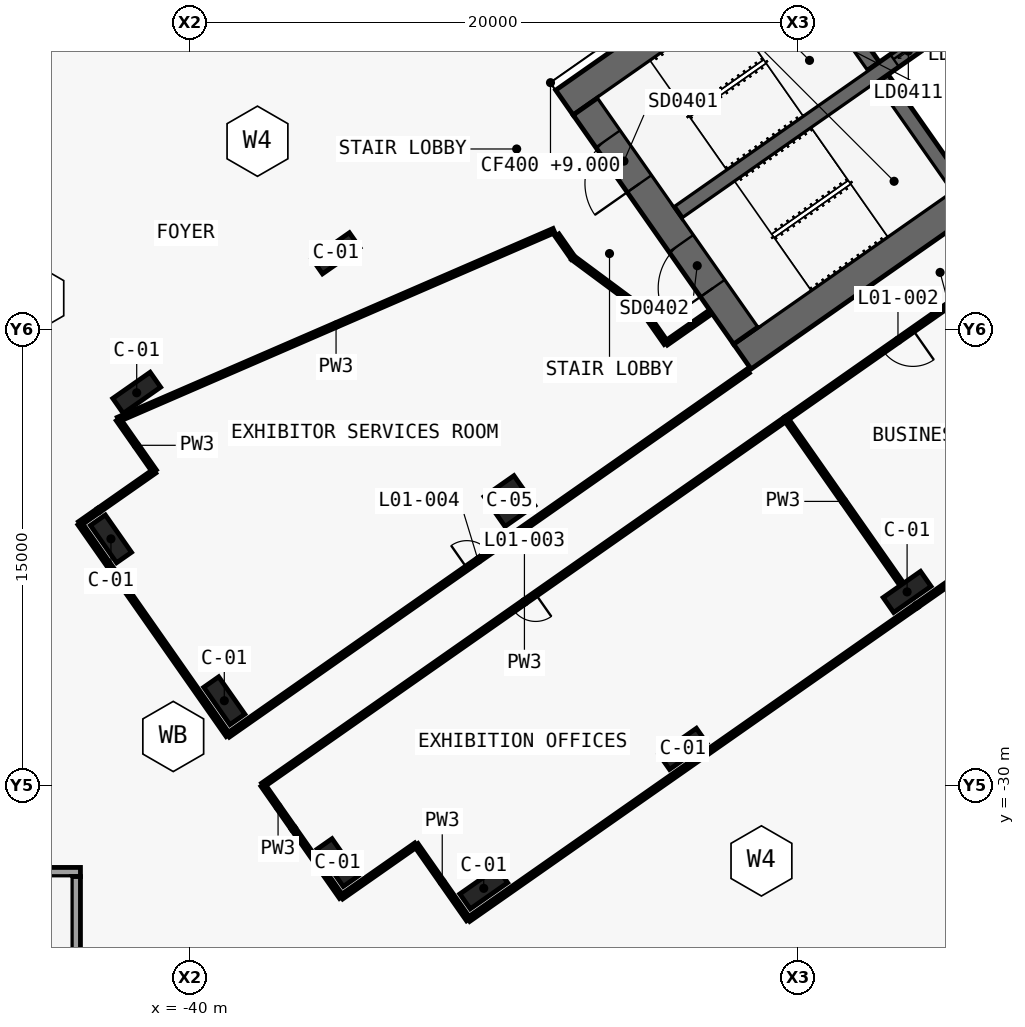
"""IFC4 building model, lengths in metres.
Left out: names, types, materials, properties, quantities, classifications, styles, units other than length and angle.
Written with IfcOpenShell. Run it as: python <this file> out.ifc"""

import sys

from ifc_helpers import new_model, si_unit, direction, frame, frame_2d, origin, origin_2d, place, context, subcontext, project, spatial, polyline, rectangle, outline, extrude, element, fill, save


model = new_model("IFC4")
c1 = context("Model", 3, precision=1e-05, world=origin(), true_north=direction((0.0, 1.0)))
c2 = subcontext(c1, "Body", "Model", "MODEL_VIEW")
j1 = project(units=[si_unit("LENGTHUNIT", "METRE"), si_unit("PLANEANGLEUNIT", "RADIAN")], contexts=[c1])
p1 = place(None, origin())
s1 = spatial("IfcSite", under=j1, at=p1, CompositionType="ELEMENT")
p2 = place(p1, origin())
s2 = spatial("IfcBuilding", under=s1, at=p2, CompositionType="ELEMENT")
p3 = place(p2, frame((0.0, 0.0, 9.0)))
s3 = spatial("IfcBuildingStorey", under=s2, at=p3, CompositionType="ELEMENT", Elevation=9.0)
p4 = place(p3, frame((0.037, 11.867, 0.0), z_axis=(0.0, 0.0, 1.0), x_axis=(-0.819155306259, -0.573571777746, 0.0)))
e1 = element("IfcWall", 1, at=p4, inside=s3, PredefinedType="SHEAR", context=c2, shape_type="SweptSolid", body=[
    extrude(outline(polyline([(33.837, 0.5), (0.7, 0.5), (0.0, -0.5), (33.837, -0.5), (33.837, 0.5)])), origin(), (0.0, 0.0, 1.0), 9.0),
])
p5 = place(p3, frame((0.037, -0.585, 0.0), z_axis=(0.0, 0.0, 1.0), x_axis=(-0.819157152511, -0.573569140985, 0.0)))
e2 = element("IfcWall", 2, at=p5, inside=s3, PredefinedType="SHEAR", context=c2, shape_type="SweptSolid", body=[
    extrude(outline(polyline([(26.695, 0.5), (0.7, 0.5), (0.0, -0.5), (26.695, -0.5), (26.695, 0.5)])), origin(), (0.0, 0.0, 1.0), 9.0),
])
p6 = place(p5, frame((2.995, 0.0, 0.0)))
e3 = element("IfcOpeningElement", 3, at=p6, cuts=e2, PredefinedType="OPENING", context=c2, shape_type="SweptSolid", body=[
    extrude(rectangle(XDim=2.4, YDim=2.1, at=frame_2d((1.2, 1.05))), frame((0.0, 0.51, 0.0), z_axis=(0.0, -1.0, 0.0), x_axis=(1.0, 0.0, 0.0)), (0.0, 0.0, 1.0), 1.02),
])
p7 = place(p5, frame((11.995, 0.0, 0.0)))
e4 = element("IfcOpeningElement", 4, at=p7, cuts=e2, PredefinedType="OPENING", context=c2, shape_type="SweptSolid", body=[
    extrude(rectangle(XDim=2.4, YDim=2.1, at=frame_2d((1.2, 1.05))), frame((0.0, 0.51, 0.0), z_axis=(0.0, -1.0, 0.0), x_axis=(1.0, 0.0, 0.0)), (0.0, 0.0, 1.0), 1.02),
])
p8 = place(p3, frame((-21.708, -15.2, 0.0), z_axis=(0.0, 0.0, 1.0), x_axis=(-0.573576324356, 0.819152122709, 0.0)))
e5 = element("IfcWall", 5, at=p8, inside=s3, PredefinedType="SHEAR", context=c2, shape_type="SweptSolid", body=[
    extrude(outline(polyline([(0.0, 0.5), (0.0, -0.5), (9.2, -0.5), (9.2, 0.5), (0.0, 0.5)])), origin(), (0.0, 0.0, 1.0), 9.0),
])
p9 = place(p8, frame((6.1, 0.0, 0.0)))
e6 = element("IfcOpeningElement", 6, at=p9, cuts=e5, PredefinedType="OPENING", context=c2, shape_type="SweptSolid", body=[
    extrude(rectangle(XDim=1.8, YDim=2.1, at=frame_2d((0.9, 1.05))), frame((0.0, 0.51, 0.0), z_axis=(0.0, -1.0, 0.0), x_axis=(1.0, 0.0, 0.0)), (0.0, 0.0, 1.0), 1.02),
])
p10 = place(p8, frame((1.9, 0.0, 0.0)))
e7 = element("IfcOpeningElement", 7, at=p10, cuts=e5, PredefinedType="OPENING", context=c2, shape_type="SweptSolid", body=[
    extrude(rectangle(XDim=1.8, YDim=2.1, at=frame_2d((0.9, 1.05))), frame((0.0, 0.51, 0.0), z_axis=(0.0, -1.0, 0.0), x_axis=(1.0, 0.0, 0.0)), (0.0, 0.0, 1.0), 1.02),
])
p11 = place(p3, frame((-14.745, -10.324, 0.0), z_axis=(0.0, 0.0, 1.0), x_axis=(-0.57356780395, 0.819158088694, 0.0)))
e8 = element("IfcWall", 8, at=p11, inside=s3, PredefinedType="SHEAR", context=c2, shape_type="SweptSolid", body=[
    extrude(outline(polyline([(4.35, 0.25), (0.0, 0.25), (0.0, -0.25), (4.35, -0.25), (4.35, 0.25)])), origin(), (0.0, 0.0, 1.0), 9.0),
])
p12 = place(p3, frame((-17.527, -6.352, 0.0), z_axis=(0.0, 0.0, 1.0), x_axis=(-0.573530143085, 0.819184457233, 0.0)))
e9 = element("IfcWall", 9, at=p12, inside=s3, PredefinedType="SHEAR", context=c2, shape_type="SweptSolid", body=[
    extrude(outline(polyline([(4.35, -0.25), (4.35, 0.25), (0.0, 0.25), (0.0, -0.25), (4.35, -0.25)])), origin(), (0.0, 0.0, 1.0), 9.0),
])
p13 = place(p3, frame((-2.638, 3.768, 0.0), z_axis=(0.0, 0.0, 1.0), x_axis=(-0.819148977158, -0.573580816643, 0.0)))
e10 = element("IfcWall", 10, at=p13, inside=s3, PredefinedType="SHEAR", context=c2, shape_type="SweptSolid", body=[
    extrude(outline(polyline([(26.0, 0.25), (0.0, 0.25), (0.0, -0.25), (26.0, -0.25), (26.0, 0.25)])), origin(), (0.0, 0.0, 1.0), 9.0),
])
p14 = place(p13, frame((1.169, 0.0, 0.0)))
e11 = element("IfcOpeningElement", 11, at=p14, cuts=e10, PredefinedType="OPENING", context=c2, shape_type="SweptSolid", body=[
    extrude(rectangle(XDim=1.1, YDim=2.1, at=frame_2d((0.55, 1.05))), frame((0.0, 0.26, 0.0), z_axis=(0.0, -1.0, 0.0), x_axis=(1.0, 0.0, 0.0)), (0.0, 0.0, 1.0), 0.52),
])
p15 = place(p13, frame((3.206, 0.0, 0.0)))
e12 = element("IfcOpeningElement", 12, at=p15, cuts=e10, PredefinedType="OPENING", context=c2, shape_type="SweptSolid", body=[
    extrude(rectangle(XDim=1.1, YDim=2.1, at=frame_2d((0.55, 1.05))), frame((0.0, 0.26, 0.0), z_axis=(0.0, -1.0, 0.0), x_axis=(1.0, 0.0, 0.0)), (0.0, 0.0, 1.0), 0.52),
])
p16 = place(p13, frame((5.244, 0.0, 0.0)))
e13 = element("IfcOpeningElement", 13, at=p16, cuts=e10, PredefinedType="OPENING", context=c2, shape_type="SweptSolid", body=[
    extrude(rectangle(XDim=1.1, YDim=2.1, at=frame_2d((0.55, 1.05))), frame((0.0, 0.26, 0.0), z_axis=(0.0, -1.0, 0.0), x_axis=(1.0, 0.0, 0.0)), (0.0, 0.0, 1.0), 0.52),
])
p17 = place(p13, frame((7.281, 0.0, 0.0)))
e14 = element("IfcOpeningElement", 14, at=p17, cuts=e10, PredefinedType="OPENING", context=c2, shape_type="SweptSolid", body=[
    extrude(rectangle(XDim=1.1, YDim=2.1, at=frame_2d((0.55, 1.05))), frame((0.0, 0.26, 0.0), z_axis=(0.0, -1.0, 0.0), x_axis=(1.0, 0.0, 0.0)), (0.0, 0.0, 1.0), 0.52),
])
p18 = place(p13, frame((9.688, 0.0, 0.0)))
e15 = element("IfcOpeningElement", 15, at=p18, cuts=e10, PredefinedType="OPENING", context=c2, shape_type="SweptSolid", body=[
    extrude(rectangle(XDim=1.1, YDim=2.1, at=frame_2d((0.55, 1.05))), frame((0.0, 0.26, 0.0), z_axis=(0.0, -1.0, 0.0), x_axis=(1.0, 0.0, 0.0)), (0.0, 0.0, 1.0), 0.52),
])
p19 = place(p13, frame((11.863, 0.0, 0.0)))
e16 = element("IfcOpeningElement", 16, at=p19, cuts=e10, PredefinedType="OPENING", context=c2, shape_type="SweptSolid", body=[
    extrude(rectangle(XDim=1.1, YDim=2.1, at=frame_2d((0.55, 1.05))), frame((0.0, 0.26, 0.0), z_axis=(0.0, -1.0, 0.0), x_axis=(1.0, 0.0, 0.0)), (0.0, 0.0, 1.0), 0.52),
])
p20 = place(p13, frame((14.038, 0.0, 0.0)))
e17 = element("IfcOpeningElement", 17, at=p20, cuts=e10, PredefinedType="OPENING", context=c2, shape_type="SweptSolid", body=[
    extrude(rectangle(XDim=1.1, YDim=2.1, at=frame_2d((0.55, 1.05))), frame((0.0, 0.26, 0.0), z_axis=(0.0, -1.0, 0.0), x_axis=(1.0, 0.0, 0.0)), (0.0, 0.0, 1.0), 0.52),
])
p21 = place(p13, frame((16.212, 0.0, 0.0)))
e18 = element("IfcOpeningElement", 18, at=p21, cuts=e10, PredefinedType="OPENING", context=c2, shape_type="SweptSolid", body=[
    extrude(rectangle(XDim=1.1, YDim=2.1, at=frame_2d((0.55, 1.05))), frame((0.0, 0.26, 0.0), z_axis=(0.0, -1.0, 0.0), x_axis=(1.0, 0.0, 0.0)), (0.0, 0.0, 1.0), 0.52),
])
p22 = place(p3, frame((-49.4, -32.85, 0.0), z_axis=(0.0, 0.0, 1.0), x_axis=(1.0, 0.0, 0.0)))
e19 = element("IfcWall", 19, at=p22, inside=s3, PredefinedType="SOLIDWALL", context=c2, shape_type="SweptSolid", body=[
    extrude(rectangle(XDim=5.8, YDim=0.3, at=frame_2d((2.9, 0.0))), origin(), (0.0, 0.0, 1.0), 9.0),
])
p23 = place(p3, frame((-43.75, -43.0, 0.0), z_axis=(0.0, 0.0, 1.0), x_axis=(0.0, 1.0, 0.0)))
e20 = element("IfcWall", 20, at=p23, inside=s3, PredefinedType="SOLIDWALL", context=c2, shape_type="SweptSolid", body=[
    extrude(rectangle(XDim=10.0, YDim=0.3, at=frame_2d((5.0, 0.0))), origin(), (0.0, 0.0, 1.0), 9.0),
])
p24 = place(p23, frame((0.212, 0.0, 0.0)))
e21 = element("IfcOpeningElement", 21, at=p24, cuts=e20, PredefinedType="OPENING", context=c2, shape_type="SweptSolid", body=[
    extrude(rectangle(XDim=2.1, YDim=2.1, at=frame_2d((1.05, 1.05))), frame((0.0, 0.16, 0.0), z_axis=(0.0, -1.0, 0.0), x_axis=(1.0, 0.0, 0.0)), (0.0, 0.0, 1.0), 0.32),
])
for number, where, z_axis, x_axis in (
    (22, (-16.41, -23.637, 0.0), (0.0, 0.0, 1.0), (-0.819, -0.574, 0.0)),
    (23, (-23.782, -28.799, 0.0), (0.0, 0.0, 1.0), (-0.819, -0.574, 0.0)),
    (24, (-30.336, -33.388, 0.0), (0.0, 0.0, 1.0), (-0.819, -0.574, 0.0)),
    (25, (-35.197, -12.498, 0.0), (0.0, 0.0, 1.0), (-0.819, -0.574, 0.0)),
    (26, (-41.75, -17.087, 0.0), (0.0, 0.0, 1.0), (-0.819, -0.574, 0.0)),
    (27, (-35.14, -32.541, 0.0), (0.0, 0.0, 1.0), (-0.574, 0.819, 0.0)),
    (28, (-38.869, -27.216, 0.0), (0.0, 0.0, 1.0), (-0.574, 0.819, 0.0)),
    (29, (-42.597, -21.892, 0.0), (0.0, 0.0, 1.0), (-0.574, 0.819, 0.0)),
):
    element("IfcColumn", number, at=place(p3, frame(where, z_axis=z_axis, x_axis=x_axis)), inside=s3, PredefinedType="COLUMN", context=c2, shape_type="SweptSolid", body=[
        extrude(rectangle(XDim=1.5, YDim=0.6, at=origin_2d()), origin(), (0.0, 0.0, 1.0), 9.0),
    ])
p25 = place(p3, frame((-29.49, -20.649, 0.0), z_axis=(0.0, 0.0, 1.0), x_axis=(-0.819152044289, -0.573576436351, 0.0)))
e30 = element("IfcColumn", 30, at=p25, inside=s3, PredefinedType="COLUMN", context=c2, shape_type="SweptSolid", body=[
    extrude(rectangle(XDim=1.2, YDim=1.2, at=origin_2d()), origin(), (0.0, 0.0, 1.0), 9.0),
])
p26 = place(p3, frame((-38.746, -28.351, 0.0), z_axis=(0.0, 0.0, 1.0), x_axis=(0.819148965066, 0.573580833911, 0.0)))
e31 = element("IfcWall", 31, at=p26, inside=s3, PredefinedType="PARTITIONING", context=c2, shape_type="SweptSolid", body=[
    extrude(rectangle(XDim=20.88, YDim=0.15, at=frame_2d((10.44, 0.0))), origin(), (0.0, 0.0, 1.0), 7.18),
])
p27 = place(p26, frame((9.59, 0.0, 0.0)))
e32 = element("IfcOpeningElement", 32, at=p27, cuts=e31, PredefinedType="OPENING", context=c2, shape_type="SweptSolid", body=[
    extrude(rectangle(XDim=0.9, YDim=2.1, at=frame_2d((0.45, 1.05))), frame((0.0, 0.085, 0.0), z_axis=(0.0, -1.0, 0.0), x_axis=(1.0, 0.0, 0.0)), (0.0, 0.0, 1.0), 0.17),
])
p28 = place(p3, frame((-13.022, -12.781, 0.0), z_axis=(0.0, 0.0, 1.0), x_axis=(-0.819142740634, -0.573589723117, 0.0)))
e33 = element("IfcWall", 33, at=p28, inside=s3, PredefinedType="PARTITIONING", context=c2, shape_type="SweptSolid", body=[
    extrude(rectangle(XDim=9.004, YDim=0.15, at=frame_2d((4.502, 0.0))), origin(), (0.0, 0.0, 1.0), 7.18),
])
p29 = place(p28, frame((3.902, 0.0, 0.0)))
e34 = element("IfcOpeningElement", 34, at=p29, cuts=e33, PredefinedType="OPENING", context=c2, shape_type="SweptSolid", body=[
    extrude(rectangle(XDim=1.2, YDim=2.4, at=frame_2d((0.6, 1.2))), frame((0.0, 0.085, 0.0), z_axis=(0.0, -1.0, 0.0), x_axis=(1.0, 0.0, 0.0)), (0.0, 0.0, 1.0), 0.17),
])
p30 = place(p3, frame((-20.395, -17.943, 0.0), z_axis=(0.0, 0.0, 1.0), x_axis=(-0.819154909514, -0.573572344364, 0.0)))
e35 = element("IfcWall", 35, at=p30, inside=s3, PredefinedType="PARTITIONING", context=c2, shape_type="SweptSolid", body=[
    extrude(rectangle(XDim=21.002, YDim=0.15, at=frame_2d((10.501, 0.0))), origin(), (0.0, 0.0, 1.0), 7.18),
])
p31 = place(p30, frame((10.051, 0.0, 0.0)))
e36 = element("IfcOpeningElement", 36, at=p31, cuts=e35, PredefinedType="OPENING", context=c2, shape_type="SweptSolid", body=[
    extrude(rectangle(XDim=0.9, YDim=2.1, at=frame_2d((0.45, 1.05))), frame((0.0, 0.085, 0.0), z_axis=(0.0, -1.0, 0.0), x_axis=(1.0, 0.0, 0.0)), (0.0, 0.0, 1.0), 0.17),
])
p32 = place(p3, frame((-16.095, -24.09, 0.0), z_axis=(0.0, 0.0, 1.0), x_axis=(0.819146559812, 0.573584268917, 0.0)))
e37 = element("IfcWall", 37, at=p32, inside=s3, PredefinedType="PARTITIONING", context=c2, shape_type="SweptSolid", body=[
    extrude(rectangle(XDim=9.004, YDim=0.15, at=frame_2d((4.502, 0.0))), origin(), (0.0, 0.0, 1.0), 7.58),
])
p33 = place(p3, frame((-35.017, -33.676, 0.0), z_axis=(0.0, 0.0, 1.0), x_axis=(0.81917072002, 0.573549763719, 0.0)))
e38 = element("IfcWall", 38, at=p33, inside=s3, PredefinedType="PARTITIONING", context=c2, shape_type="SweptSolid", body=[
    extrude(rectangle(XDim=2.999, YDim=0.15, at=frame_2d((1.5, 0.0))), origin(), (0.0, 0.0, 1.0), 7.38),
])
p34 = place(p3, frame((-32.56, -31.956, 0.0), z_axis=(0.0, 0.0, 1.0), x_axis=(0.573604390867, -0.819132469615, 0.0)))
e39 = element("IfcWall", 39, at=p34, inside=s3, PredefinedType="PARTITIONING", context=c2, shape_type="SweptSolid", body=[
    extrude(rectangle(XDim=2.999, YDim=0.15, at=frame_2d((1.5, 0.0))), origin(), (0.0, 0.0, 1.0), 7.38),
])
p35 = place(p3, frame((-30.839, -34.413, 0.0), z_axis=(0.0, 0.0, 1.0), x_axis=(0.819149083218, 0.573580665175, 0.0)))
e40 = element("IfcWall", 40, at=p35, inside=s3, PredefinedType="PARTITIONING", context=c2, shape_type="SweptSolid", body=[
    extrude(rectangle(XDim=18.002, YDim=0.15, at=frame_2d((9.001, 0.0))), origin(), (0.0, 0.0, 1.0), 8.6),
])
p36 = place(p3, frame((-36.599, -31.418, 0.0), z_axis=(0.0, 0.0, 1.0), x_axis=(0.57362881286, -0.819115367367, 0.0)))
e41 = element("IfcWall", 41, at=p36, inside=s3, PredefinedType="PARTITIONING", context=c2, shape_type="SweptSolid", body=[
    extrude(rectangle(XDim=2.756, YDim=0.15, at=frame_2d((1.378, 0.0))), origin(), (0.0, 0.0, 1.0), 8.6),
])
p37 = place(p3, frame((-42.359, -17.961, 0.0), z_axis=(0.0, 0.0, 1.0), x_axis=(0.573603984281, -0.819132754331, 0.0)))
e42 = element("IfcWall", 42, at=p37, inside=s3, PredefinedType="PARTITIONING", context=c2, shape_type="SweptSolid", body=[
    extrude(rectangle(XDim=2.082, YDim=0.15, at=frame_2d((1.041, 0.0))), origin(), (0.0, 0.0, 1.0), 7.38),
])
p38 = place(p3, frame((-41.165, -19.667, 0.0), z_axis=(0.0, 0.0, 1.0), x_axis=(-0.819149945048, -0.573579434366, 0.0)))
e43 = element("IfcWall", 43, at=p38, inside=s3, PredefinedType="PARTITIONING", context=c2, shape_type="SweptSolid", body=[
    extrude(rectangle(XDim=2.239, YDim=0.15, at=frame_2d((1.119, 0.0))), origin(), (0.0, 0.0, 1.0), 7.38),
])
p39 = place(p3, frame((-43.622, -21.387, 0.0), z_axis=(0.0, 0.0, 1.0), x_axis=(0.573487395822, -0.819214383928, 0.0)))
e44 = element("IfcWall", 44, at=p39, inside=s3, PredefinedType="PARTITIONING", context=c2, shape_type="SweptSolid", body=[
    extrude(rectangle(XDim=8.503, YDim=0.15, at=frame_2d((4.251, 0.0))), origin(), (0.0, 0.0, 1.0), 8.6),
])
p40 = place(p3, frame((-43.0, -20.952, 0.0), z_axis=(0.0, 0.0, 1.0), x_axis=(-0.819216809636, -0.573483930734, 0.0)))
e45 = element("IfcWall", 45, at=p40, inside=s3, PredefinedType="PARTITIONING", context=c2, shape_type="SweptSolid", body=[
    extrude(rectangle(XDim=0.759, YDim=0.15, at=frame_2d((0.379, 0.0))), origin(), (0.0, 0.0, 1.0), 8.6),
])
p41 = place(p3, frame((-37.6, -29.988, 0.0), z_axis=(0.0, 0.0, 1.0), x_axis=(0.573518712821, -0.819192459709, 0.0)))
e46 = element("IfcWall", 46, at=p41, inside=s3, PredefinedType="PARTITIONING", context=c2, shape_type="SweptSolid", body=[
    extrude(rectangle(XDim=1.744, YDim=0.15, at=frame_2d((0.872, 0.0))), origin(), (0.0, 0.0, 1.0), 8.6),
])
p42 = place(p3, frame((-28.026, -11.751, 0.0), z_axis=(0.0, 0.0, 1.0), x_axis=(-0.91753357696, -0.397658314577, 0.0)))
e47 = element("IfcWall", 47, at=p42, inside=s3, PredefinedType="PARTITIONING", context=c2, shape_type="SweptSolid", body=[
    extrude(rectangle(XDim=15.621, YDim=0.15, at=frame_2d((7.811, 0.0))), origin(), (0.0, 0.0, 1.0), 7.18),
])
p43 = place(p3, frame((-22.961, -14.49, 0.0), z_axis=(0.0, 0.0, 1.0), x_axis=(-0.819109000826, -0.573637903879, 0.0)))
e48 = element("IfcWall", 48, at=p43, inside=s3, PredefinedType="PARTITIONING", context=c2, shape_type="SweptSolid", body=[
    extrude(rectangle(XDim=1.68, YDim=0.15, at=frame_2d((0.84, 0.0))), origin(), (0.0, 0.0, 1.0), 8.6),
])
p44 = place(p3, frame((-24.337, -15.454, 0.0), z_axis=(0.0, 0.0, 1.0), x_axis=(-0.573571252353, 0.819155674139, 0.0)))
e49 = element("IfcWall", 49, at=p44, inside=s3, PredefinedType="PARTITIONING", context=c2, shape_type="SweptSolid", body=[
    extrude(rectangle(XDim=1.354, YDim=0.15, at=frame_2d((0.677, 0.0))), origin(), (0.0, 0.0, 1.0), 8.6),
])
p45 = place(p3, frame((-25.114, -14.345, 0.0), z_axis=(0.0, 0.0, 1.0), x_axis=(-0.803169525988, 0.59575054555, 0.0)))
e50 = element("IfcWall", 50, at=p45, inside=s3, PredefinedType="PARTITIONING", context=c2, shape_type="SweptSolid", body=[
    extrude(rectangle(XDim=2.846, YDim=0.15, at=frame_2d((1.423, 0.0))), origin(), (0.0, 0.0, 1.0), 8.6),
])
p46 = place(p3, frame((-27.4, -12.649, 0.0), z_axis=(0.0, 0.0, 1.0), x_axis=(-0.573713979357, 0.819055718428, 0.0)))
e51 = element("IfcWall", 51, at=p46, inside=s3, PredefinedType="PARTITIONING", context=c2, shape_type="SweptSolid", body=[
    extrude(rectangle(XDim=0.912, YDim=0.15, at=frame_2d((0.456, 0.0))), origin(), (0.0, 0.0, 1.0), 8.6),
])
p47 = place(p3, frame((-16.594, -23.375, 0.0), z_axis=(0.0, 0.0, 1.0), x_axis=(-0.57359826181, 0.819136761505, 0.0)))
e52 = element("IfcWall", 52, at=p47, inside=s3, PredefinedType="PARTITIONING", context=c2, shape_type="SweptSolid", body=[
    extrude(rectangle(XDim=6.63, YDim=0.15, at=frame_2d((3.315, 0.0))), origin(), (0.0, 0.0, 1.0), 7.18),
])
p48 = place(p21, origin())
e53 = element("IfcDoor", 53, at=p48, inside=s3, OperationType="SLIDING_TO_RIGHT", PredefinedType="DOOR", context=c2, shape_type="SweptSolid", body=[
    extrude(rectangle(XDim=1.1, YDim=2.1, at=frame_2d((0.55, 1.05))), frame((0.0, 0.025, 0.0), z_axis=(0.0, -1.0, 0.0), x_axis=(1.0, 0.0, 0.0)), (0.0, 0.0, 1.0), 0.05),
])
fill(e18, e53)
p49 = place(p9, origin())
e54 = element("IfcDoor", 54, at=p49, inside=s3, OperationType="DOUBLE_DOOR_SINGLE_SWING", PredefinedType="DOOR", context=c2, shape_type="SweptSolid", body=[
    extrude(rectangle(XDim=1.8, YDim=2.1, at=frame_2d((0.9, 1.05))), frame((0.0, 0.025, 0.0), z_axis=(0.0, -1.0, 0.0), x_axis=(1.0, 0.0, 0.0)), (0.0, 0.0, 1.0), 0.05),
])
fill(e6, e54)
p50 = place(p10, origin())
e55 = element("IfcDoor", 55, at=p50, inside=s3, OperationType="DOUBLE_DOOR_SINGLE_SWING", PredefinedType="DOOR", context=c2, shape_type="SweptSolid", body=[
    extrude(rectangle(XDim=1.8, YDim=2.1, at=frame_2d((0.9, 1.05))), frame((0.0, 0.025, 0.0), z_axis=(0.0, -1.0, 0.0), x_axis=(1.0, 0.0, 0.0)), (0.0, 0.0, 1.0), 0.05),
])
fill(e7, e55)
p51 = place(p29, origin())
e56 = element("IfcDoor", 56, at=p51, inside=s3, OperationType="DOUBLE_DOOR_SINGLE_SWING", PredefinedType="DOOR", context=c2, shape_type="SweptSolid", body=[
    extrude(rectangle(XDim=1.2, YDim=2.4, at=frame_2d((0.6, 1.2))), frame((0.0, 0.025, 0.0), z_axis=(0.0, -1.0, 0.0), x_axis=(1.0, 0.0, 0.0)), (0.0, 0.0, 1.0), 0.05),
])
fill(e34, e56)
p52 = place(p31, origin())
e57 = element("IfcDoor", 57, at=p52, inside=s3, OperationType="SINGLE_SWING_RIGHT", PredefinedType="DOOR", context=c2, shape_type="SweptSolid", body=[
    extrude(rectangle(XDim=0.9, YDim=2.1, at=frame_2d((0.45, 1.05))), frame((0.0, 0.025, 0.0), z_axis=(0.0, -1.0, 0.0), x_axis=(1.0, 0.0, 0.0)), (0.0, 0.0, 1.0), 0.05),
])
fill(e36, e57)
p53 = place(p27, origin())
e58 = element("IfcDoor", 58, at=p53, inside=s3, OperationType="SINGLE_SWING_RIGHT", PredefinedType="DOOR", context=c2, shape_type="SweptSolid", body=[
    extrude(rectangle(XDim=0.9, YDim=2.1, at=frame_2d((0.45, 1.05))), frame((0.0, 0.025, 0.0), z_axis=(0.0, -1.0, 0.0), x_axis=(1.0, 0.0, 0.0)), (0.0, 0.0, 1.0), 0.05),
])
fill(e32, e58)
save(model, sys.argv[1])
